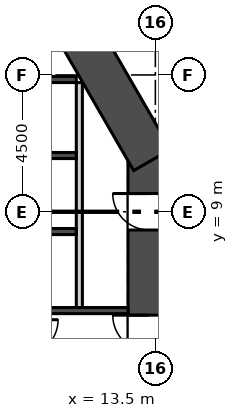
"""IFC4 building model, lengths in metres.
Left out: names, types, materials, properties, quantities, classifications, styles, units other than length and angle.
Written with IfcOpenShell. Run it as: python <this file> out.ifc"""

import sys

from ifc_helpers import new_model, si_unit, direction, frame, frame_2d, origin, place, context, subcontext, project, spatial, rectangle, extrude, element, fill, save


model = new_model("IFC4")
c1 = context("Model", 3, precision=1e-05, world=origin(), true_north=direction((0.0, 1.0)))
c2 = subcontext(c1, "Body", "Model", "MODEL_VIEW")
j1 = project(units=[si_unit("LENGTHUNIT", "METRE"), si_unit("PLANEANGLEUNIT", "RADIAN")], contexts=[c1])
p1 = place(None, origin())
s1 = spatial("IfcSite", under=j1, at=p1, CompositionType="ELEMENT")
p2 = place(p1, origin())
s2 = spatial("IfcBuilding", under=s1, at=p2, CompositionType="ELEMENT")
p3 = place(p2, frame((0.0, 0.0, 47.5)))
s3 = spatial("IfcBuildingStorey", under=s2, at=p3, CompositionType="ELEMENT", Elevation=47.5)
p4 = place(p3, frame((13.3, 0.85, 0.0), z_axis=(0.0, 0.0, 1.0), x_axis=(0.0, 1.0, 0.0)))
e1 = element("IfcWall", 1, at=p4, inside=s3, PredefinedType="SHEAR", context=c2, shape_type="SweptSolid", body=[
    extrude(rectangle(XDim=10.202, YDim=1.4, at=frame_2d((5.101, 0.0))), origin(), (0.0, 0.0, 1.0), 5.4),
])
p5 = place(p4, frame((3.55, 0.0, 0.0)))
e2 = element("IfcOpeningElement", 2, at=p5, cuts=e1, PredefinedType="OPENING", context=c2, shape_type="SweptSolid", body=[
    extrude(rectangle(XDim=1.2, YDim=2.1, at=frame_2d((0.6, 1.05))), frame((0.0, 0.71, 0.0), z_axis=(0.0, -1.0, 0.0), x_axis=(1.0, 0.0, 0.0)), (0.0, 0.0, 1.0), 1.42),
])
p6 = place(p4, frame((7.55, 0.0, 0.0)))
e3 = element("IfcOpeningElement", 3, at=p6, cuts=e1, PredefinedType="OPENING", context=c2, shape_type="SweptSolid", body=[
    extrude(rectangle(XDim=1.2, YDim=2.1, at=frame_2d((0.6, 1.05))), frame((0.0, 0.71, 0.0), z_axis=(0.0, -1.0, 0.0), x_axis=(1.0, 0.0, 0.0)), (0.0, 0.0, 1.0), 1.42),
])
p7 = place(p3, frame((13.394, 10.703, 0.0), z_axis=(0.0, 0.0, 1.0), x_axis=(-0.50000187635, 0.866024320471, 0.0)))
e4 = element("IfcWall", 4, at=p7, inside=s3, PredefinedType="SHEAR", context=c2, shape_type="SweptSolid", body=[
    extrude(rectangle(XDim=9.177, YDim=1.4, at=frame_2d((4.588, 0.0))), origin(), (0.0, 0.0, 1.0), 5.4),
])
p8 = place(p3, frame((31.98, 7.709, 0.0), z_axis=(0.0, 0.0, 1.0), x_axis=(-0.500000125387, 0.866025331392, 0.0)))
e5 = element("IfcWall", 5, at=p8, inside=s3, PredefinedType="SOLIDWALL", context=c2, shape_type="SweptSolid", body=[
    extrude(rectangle(XDim=55.255, YDim=0.34, at=frame_2d((27.628, 0.0))), origin(), (0.0, 0.0, 1.0), 5.1),
])
p9 = place(p8, frame((1.314, 0.0, 0.9)))
e6 = element("IfcOpeningElement", 6, at=p9, cuts=e5, PredefinedType="OPENING", context=c2, shape_type="SweptSolid", body=[
    extrude(rectangle(XDim=1.885, YDim=3.0, at=frame_2d((0.942, 1.5))), frame((0.0, 0.18, 0.0), z_axis=(0.0, -1.0, 0.0), x_axis=(1.0, 0.0, 0.0)), (0.0, 0.0, 1.0), 0.36),
])
p10 = place(p8, frame((4.314, 0.0, 0.9)))
e7 = element("IfcOpeningElement", 7, at=p10, cuts=e5, PredefinedType="OPENING", context=c2, shape_type="SweptSolid", body=[
    extrude(rectangle(XDim=1.885, YDim=3.0, at=frame_2d((0.942, 1.5))), frame((0.0, 0.18, 0.0), z_axis=(0.0, -1.0, 0.0), x_axis=(1.0, 0.0, 0.0)), (0.0, 0.0, 1.0), 0.36),
])
p11 = place(p8, frame((7.314, 0.0, 0.9)))
e8 = element("IfcOpeningElement", 8, at=p11, cuts=e5, PredefinedType="OPENING", context=c2, shape_type="SweptSolid", body=[
    extrude(rectangle(XDim=1.885, YDim=3.0, at=frame_2d((0.942, 1.5))), frame((0.0, 0.18, 0.0), z_axis=(0.0, -1.0, 0.0), x_axis=(1.0, 0.0, 0.0)), (0.0, 0.0, 1.0), 0.36),
])
p12 = place(p8, frame((10.314, 0.0, 0.9)))
e9 = element("IfcOpeningElement", 9, at=p12, cuts=e5, PredefinedType="OPENING", context=c2, shape_type="SweptSolid", body=[
    extrude(rectangle(XDim=1.885, YDim=3.0, at=frame_2d((0.942, 1.5))), frame((0.0, 0.18, 0.0), z_axis=(0.0, -1.0, 0.0), x_axis=(1.0, 0.0, 0.0)), (0.0, 0.0, 1.0), 0.36),
])
p13 = place(p8, frame((13.314, 0.0, 0.9)))
e10 = element("IfcOpeningElement", 10, at=p13, cuts=e5, PredefinedType="OPENING", context=c2, shape_type="SweptSolid", body=[
    extrude(rectangle(XDim=1.885, YDim=3.0, at=frame_2d((0.942, 1.5))), frame((0.0, 0.18, 0.0), z_axis=(0.0, -1.0, 0.0), x_axis=(1.0, 0.0, 0.0)), (0.0, 0.0, 1.0), 0.36),
])
p14 = place(p8, frame((16.314, 0.0, 0.9)))
e11 = element("IfcOpeningElement", 11, at=p14, cuts=e5, PredefinedType="OPENING", context=c2, shape_type="SweptSolid", body=[
    extrude(rectangle(XDim=1.885, YDim=3.0, at=frame_2d((0.942, 1.5))), frame((0.0, 0.18, 0.0), z_axis=(0.0, -1.0, 0.0), x_axis=(1.0, 0.0, 0.0)), (0.0, 0.0, 1.0), 0.36),
])
p15 = place(p8, frame((19.314, 0.0, 0.9)))
e12 = element("IfcOpeningElement", 12, at=p15, cuts=e5, PredefinedType="OPENING", context=c2, shape_type="SweptSolid", body=[
    extrude(rectangle(XDim=1.885, YDim=3.0, at=frame_2d((0.942, 1.5))), frame((0.0, 0.18, 0.0), z_axis=(0.0, -1.0, 0.0), x_axis=(1.0, 0.0, 0.0)), (0.0, 0.0, 1.0), 0.36),
])
p16 = place(p8, frame((22.314, 0.0, 0.9)))
e13 = element("IfcOpeningElement", 13, at=p16, cuts=e5, PredefinedType="OPENING", context=c2, shape_type="SweptSolid", body=[
    extrude(rectangle(XDim=1.885, YDim=3.0, at=frame_2d((0.942, 1.5))), frame((0.0, 0.18, 0.0), z_axis=(0.0, -1.0, 0.0), x_axis=(1.0, 0.0, 0.0)), (0.0, 0.0, 1.0), 0.36),
])
p17 = place(p8, frame((25.314, 0.0, 0.9)))
e14 = element("IfcOpeningElement", 14, at=p17, cuts=e5, PredefinedType="OPENING", context=c2, shape_type="SweptSolid", body=[
    extrude(rectangle(XDim=1.885, YDim=3.0, at=frame_2d((0.942, 1.5))), frame((0.0, 0.18, 0.0), z_axis=(0.0, -1.0, 0.0), x_axis=(1.0, 0.0, 0.0)), (0.0, 0.0, 1.0), 0.36),
])
p18 = place(p8, frame((28.314, 0.0, 0.9)))
e15 = element("IfcOpeningElement", 15, at=p18, cuts=e5, PredefinedType="OPENING", context=c2, shape_type="SweptSolid", body=[
    extrude(rectangle(XDim=1.885, YDim=3.0, at=frame_2d((0.942, 1.5))), frame((0.0, 0.18, 0.0), z_axis=(0.0, -1.0, 0.0), x_axis=(1.0, 0.0, 0.0)), (0.0, 0.0, 1.0), 0.36),
])
p19 = place(p8, frame((31.314, 0.0, 0.9)))
e16 = element("IfcOpeningElement", 16, at=p19, cuts=e5, PredefinedType="OPENING", context=c2, shape_type="SweptSolid", body=[
    extrude(rectangle(XDim=1.885, YDim=3.0, at=frame_2d((0.942, 1.5))), frame((0.0, 0.18, 0.0), z_axis=(0.0, -1.0, 0.0), x_axis=(1.0, 0.0, 0.0)), (0.0, 0.0, 1.0), 0.36),
])
p20 = place(p8, frame((34.314, 0.0, 0.9)))
e17 = element("IfcOpeningElement", 17, at=p20, cuts=e5, PredefinedType="OPENING", context=c2, shape_type="SweptSolid", body=[
    extrude(rectangle(XDim=1.885, YDim=3.0, at=frame_2d((0.942, 1.5))), frame((0.0, 0.18, 0.0), z_axis=(0.0, -1.0, 0.0), x_axis=(1.0, 0.0, 0.0)), (0.0, 0.0, 1.0), 0.36),
])
p21 = place(p8, frame((37.314, 0.0, 0.9)))
e18 = element("IfcOpeningElement", 18, at=p21, cuts=e5, PredefinedType="OPENING", context=c2, shape_type="SweptSolid", body=[
    extrude(rectangle(XDim=1.885, YDim=3.0, at=frame_2d((0.942, 1.5))), frame((0.0, 0.18, 0.0), z_axis=(0.0, -1.0, 0.0), x_axis=(1.0, 0.0, 0.0)), (0.0, 0.0, 1.0), 0.36),
])
p22 = place(p8, frame((40.314, 0.0, 0.9)))
e19 = element("IfcOpeningElement", 19, at=p22, cuts=e5, PredefinedType="OPENING", context=c2, shape_type="SweptSolid", body=[
    extrude(rectangle(XDim=1.885, YDim=3.0, at=frame_2d((0.942, 1.5))), frame((0.0, 0.18, 0.0), z_axis=(0.0, -1.0, 0.0), x_axis=(1.0, 0.0, 0.0)), (0.0, 0.0, 1.0), 0.36),
])
p23 = place(p8, frame((43.314, 0.0, 0.9)))
e20 = element("IfcOpeningElement", 20, at=p23, cuts=e5, PredefinedType="OPENING", context=c2, shape_type="SweptSolid", body=[
    extrude(rectangle(XDim=1.885, YDim=3.0, at=frame_2d((0.942, 1.5))), frame((0.0, 0.18, 0.0), z_axis=(0.0, -1.0, 0.0), x_axis=(1.0, 0.0, 0.0)), (0.0, 0.0, 1.0), 0.36),
])
p24 = place(p8, frame((46.314, 0.0, 0.9)))
e21 = element("IfcOpeningElement", 21, at=p24, cuts=e5, PredefinedType="OPENING", context=c2, shape_type="SweptSolid", body=[
    extrude(rectangle(XDim=1.885, YDim=3.0, at=frame_2d((0.942, 1.5))), frame((0.0, 0.18, 0.0), z_axis=(0.0, -1.0, 0.0), x_axis=(1.0, 0.0, 0.0)), (0.0, 0.0, 1.0), 0.36),
])
p25 = place(p8, frame((49.314, 0.0, 0.9)))
e22 = element("IfcOpeningElement", 22, at=p25, cuts=e5, PredefinedType="OPENING", context=c2, shape_type="SweptSolid", body=[
    extrude(rectangle(XDim=1.885, YDim=3.0, at=frame_2d((0.942, 1.5))), frame((0.0, 0.18, 0.0), z_axis=(0.0, -1.0, 0.0), x_axis=(1.0, 0.0, 0.0)), (0.0, 0.0, 1.0), 0.36),
])
p26 = place(p8, frame((52.314, 0.0, 0.9)))
e23 = element("IfcOpeningElement", 23, at=p26, cuts=e5, PredefinedType="OPENING", context=c2, shape_type="SweptSolid", body=[
    extrude(rectangle(XDim=1.885, YDim=3.0, at=frame_2d((0.942, 1.5))), frame((0.0, 0.18, 0.0), z_axis=(0.0, -1.0, 0.0), x_axis=(1.0, 0.0, 0.0)), (0.0, 0.0, 1.0), 0.36),
])
p27 = place(p3, frame((11.0, 5.85, 0.0), z_axis=(0.0, 0.0, 1.0), x_axis=(0.0, 1.0, 0.0)))
e24 = element("IfcWall", 24, at=p27, inside=s3, PredefinedType="SOLIDWALL", context=c2, shape_type="SweptSolid", body=[
    extrude(rectangle(XDim=7.4, YDim=0.2, at=frame_2d((3.7, 0.0))), origin(), (0.0, 0.0, 1.0), 5.1),
])
p28 = place(p3, frame((8.9, 8.35, -0.3), z_axis=(0.0, 0.0, 1.0), x_axis=(1.0, 0.0, 0.0)))
e25 = element("IfcWall", 25, at=p28, inside=s3, PredefinedType="SOLIDWALL", context=c2, shape_type="SweptSolid", body=[
    extrude(rectangle(XDim=2.0, YDim=0.2, at=frame_2d((1.0, 0.0))), origin(), (0.0, 0.0, 1.0), 5.4),
])
p29 = place(p3, frame((1.2, 5.75, -0.3), z_axis=(0.0, 0.0, 1.0), x_axis=(1.0, 0.0, 0.0)))
e26 = element("IfcWall", 26, at=p29, inside=s3, PredefinedType="SOLIDWALL", context=c2, shape_type="SweptSolid", body=[
    extrude(rectangle(XDim=11.4, YDim=0.2, at=frame_2d((5.7, 0.0))), origin(), (0.0, 0.0, 1.0), 5.4),
])
for number, where, z_axis, x_axis in (
    (27, (8.9, 10.85, -0.3), (0.0, 0.0, 1.0), (1.0, 0.0, 0.0)),
    (28, (8.9, 13.35, -0.3), (0.0, 0.0, 1.0), (1.0, 0.0, 0.0)),
):
    element("IfcWall", number, at=place(p3, frame(where, z_axis=z_axis, x_axis=x_axis)), inside=s3, PredefinedType="SOLIDWALL", context=c2, shape_type="SweptSolid", body=[
        extrude(rectangle(XDim=2.0, YDim=0.2, at=frame_2d((1.0, 0.0))), origin(), (0.0, 0.0, 1.0), 5.4),
    ])
p30 = place(p3, frame((11.736, 22.275, 0.0), z_axis=(0.0, 0.0, 1.0), x_axis=(0.499992738267, -0.866029596307, 0.0)))
e29 = element("IfcWall", 29, at=p30, inside=s3, PredefinedType="SOLIDWALL", context=c2, shape_type="SweptSolid", body=[
    extrude(rectangle(XDim=11.624, YDim=0.3, at=frame_2d((5.812, 0.0))), origin(), (0.0, 0.0, 1.0), 5.1),
])
p31 = place(p5, origin())
e30 = element("IfcDoor", 30, at=p31, inside=s3, OperationType="SINGLE_SWING_RIGHT", PredefinedType="DOOR", context=c2, shape_type="SweptSolid", body=[
    extrude(rectangle(XDim=1.2, YDim=2.1, at=frame_2d((0.6, 1.05))), frame((0.0, 0.025, 0.0), z_axis=(0.0, -1.0, 0.0), x_axis=(1.0, 0.0, 0.0)), (0.0, 0.0, 1.0), 0.05),
])
fill(e2, e30)
p32 = place(p6, origin())
e31 = element("IfcDoor", 31, at=p32, inside=s3, OperationType="SINGLE_SWING_RIGHT", PredefinedType="DOOR", context=c2, shape_type="SweptSolid", body=[
    extrude(rectangle(XDim=1.2, YDim=2.1, at=frame_2d((0.6, 1.05))), frame((0.0, 0.025, 0.0), z_axis=(0.0, -1.0, 0.0), x_axis=(1.0, 0.0, 0.0)), (0.0, 0.0, 1.0), 0.05),
])
fill(e3, e31)
save(model, sys.argv[1])
